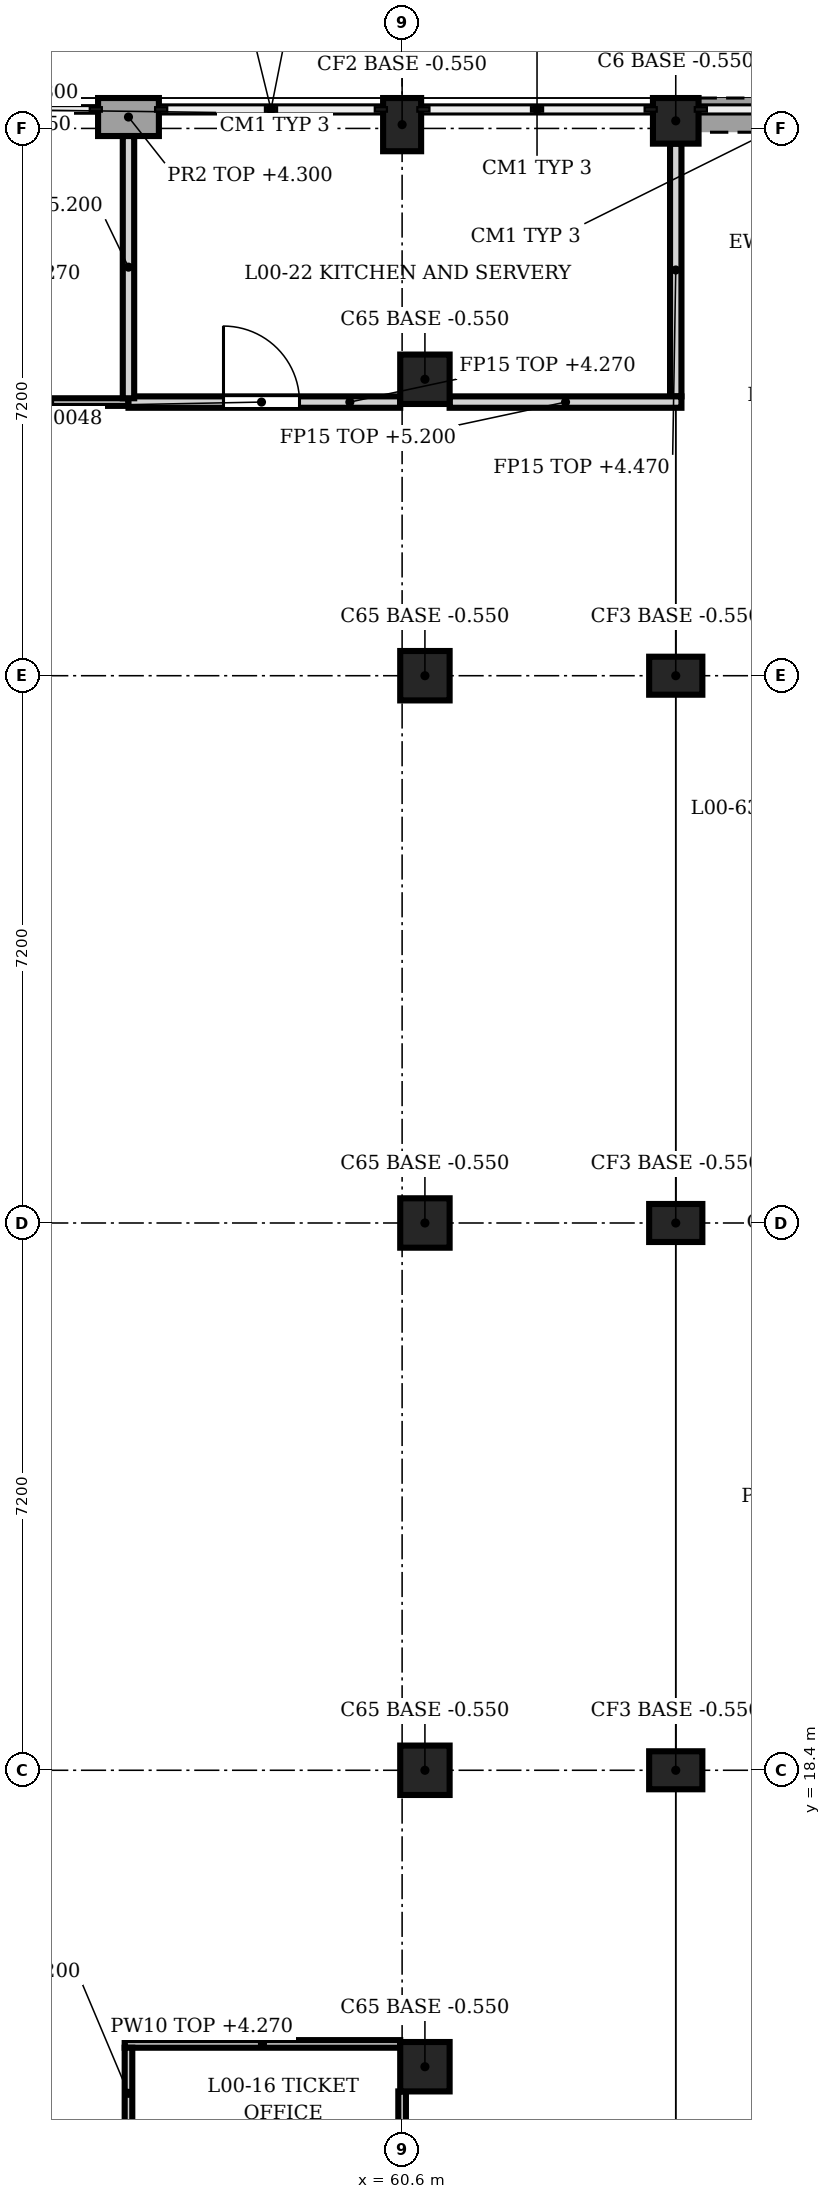
"""IFC4 building model, lengths in metres.
Left out: names, types, materials, properties, quantities, classifications, styles, units other than length and angle.
Written with IfcOpenShell. Run it as: python <this file> out.ifc"""

import sys

from ifc_helpers import new_model, si_unit, direction, frame, frame_2d, origin, origin_2d, place, context, subcontext, project, spatial, rectangle, extrude, element, fill, save


model = new_model("IFC4")
c1 = context("Model", 3, precision=1e-05, world=origin(), true_north=direction((0.0, 1.0)))
c2 = subcontext(c1, "Body", "Model", "MODEL_VIEW")
j1 = project(units=[si_unit("LENGTHUNIT", "METRE"), si_unit("PLANEANGLEUNIT", "RADIAN")], contexts=[c1])
p1 = place(None, origin())
s1 = spatial("IfcSite", under=j1, at=p1, CompositionType="ELEMENT")
p2 = place(p1, origin())
s2 = spatial("IfcBuilding", under=s1, at=p2, CompositionType="ELEMENT")
p3 = place(p2, origin())
s3 = spatial("IfcBuildingStorey", under=s2, at=p3, CompositionType="ELEMENT", Elevation=0.0)
p4 = place(p3, frame((60.6, 40.05, -0.55), z_axis=(0.0, 0.0, 1.0), x_axis=(1.0, 0.0, 0.0)))
e1 = element("IfcColumn", 1, at=p4, inside=s3, PredefinedType="COLUMN", context=c2, shape_type="SweptSolid", body=[
    extrude(rectangle(XDim=0.5, YDim=0.7, at=origin_2d()), origin(), (0.0, 0.0, 1.0), 5.95),
])
for number, where, z_axis, x_axis in (
    (2, (64.2, 18.4, -0.55), (0.0, 0.0, 1.0), (1.0, 0.0, 0.0)),
    (3, (64.2, 25.6, -0.55), (0.0, 0.0, 1.0), (1.0, 0.0, 0.0)),
    (4, (64.2, 32.8, -0.55), (0.0, 0.0, 1.0), (1.0, 0.0, 0.0)),
):
    element("IfcColumn", number, at=place(p3, frame(where, z_axis=z_axis, x_axis=x_axis)), inside=s3, PredefinedType="COLUMN", context=c2, shape_type="SweptSolid", body=[
        extrude(rectangle(XDim=0.7, YDim=0.5, at=origin_2d()), origin(), (0.0, 0.0, 1.0), 5.95),
    ])
p5 = place(p3, frame((64.2, 40.1, -0.55), z_axis=(0.0, 0.0, 1.0), x_axis=(1.0, 0.0, 0.0)))
e5 = element("IfcColumn", 5, at=p5, inside=s3, PredefinedType="COLUMN", context=c2, shape_type="SweptSolid", body=[
    extrude(rectangle(XDim=0.6, YDim=0.6, at=origin_2d()), origin(), (0.0, 0.0, 1.0), 5.95),
])
for number, where, z_axis, x_axis in (
    (6, (60.9, 14.5, -0.55), (0.0, 0.0, 1.0), (1.0, 0.0, 0.0)),
    (7, (60.9, 18.4, -0.55), (0.0, 0.0, 1.0), (1.0, 0.0, 0.0)),
    (8, (60.9, 25.6, -0.55), (0.0, 0.0, 1.0), (1.0, 0.0, 0.0)),
    (9, (60.9, 32.8, -0.55), (0.0, 0.0, 1.0), (1.0, 0.0, 0.0)),
    (10, (60.9, 36.7, -0.55), (0.0, 0.0, 1.0), (1.0, 0.0, 0.0)),
):
    element("IfcColumn", number, at=place(p3, frame(where, z_axis=z_axis, x_axis=x_axis)), inside=s3, PredefinedType="COLUMN", context=c2, shape_type="SweptSolid", body=[
        extrude(rectangle(XDim=0.65, YDim=0.65, at=origin_2d()), origin(), (0.0, 0.0, 1.0), 5.95),
    ])
p6 = place(p3, frame((56.6, 40.15, 0.0), z_axis=(0.0, 0.0, 1.0), x_axis=(1.0, 0.0, 0.0)))
e11 = element("IfcWall", 11, at=p6, inside=s3, PredefinedType="SOLIDWALL", context=c2, shape_type="SweptSolid", body=[
    extrude(rectangle(XDim=0.8, YDim=0.5, at=frame_2d((0.4, 0.0))), origin(), (0.0, 0.0, 1.0), 4.3),
])
p7 = place(p3, frame((64.5, 40.175, 0.0), z_axis=(0.0, 0.0, 1.0), x_axis=(1.0, 0.0, 0.0)))
e12 = element("IfcWall", 12, at=p7, inside=s3, PredefinedType="SOLIDWALL", context=c2, shape_type="SweptSolid", body=[
    extrude(rectangle(XDim=3.05, YDim=0.45, at=frame_2d((1.525, 0.0))), origin(), (0.0, 0.0, 1.0), 0.9),
])
p8 = place(p3, frame((56.95, 14.8, 0.0), z_axis=(0.0, 0.0, 1.0), x_axis=(1.0, 0.0, 0.0)))
e13 = element("IfcWall", 13, at=p8, inside=s3, PredefinedType="PARTITIONING", context=c2, shape_type="SweptSolid", body=[
    extrude(rectangle(XDim=3.625, YDim=0.1, at=frame_2d((1.812, 0.0))), origin(), (0.0, 0.0, 1.0), 4.27),
])
p9 = place(p3, frame((54.925, 36.4, 0.0), z_axis=(0.0, 0.0, 1.0), x_axis=(1.0, 0.0, 0.0)))
e14 = element("IfcWall", 14, at=p9, inside=s3, PredefinedType="PARTITIONING", context=c2, shape_type="SweptSolid", body=[
    extrude(rectangle(XDim=2.075, YDim=0.1, at=frame_2d((1.038, 0.0))), origin(), (0.0, 0.0, 1.0), 4.27),
])
p10 = place(p3, frame((57.0, 36.4, 0.0), z_axis=(0.0, 0.0, 1.0), x_axis=(1.0, 0.0, 0.0)))
e15 = element("IfcWall", 15, at=p10, inside=s3, PredefinedType="PARTITIONING", context=c2, shape_type="SweptSolid", body=[
    extrude(rectangle(XDim=3.575, YDim=0.15, at=frame_2d((1.788, 0.0))), origin(), (0.0, 0.0, 1.0), 4.27),
])
p11 = place(p10, frame((1.25, 0.0, 0.0)))
e16 = element("IfcOpeningElement", 16, at=p11, cuts=e15, PredefinedType="OPENING", context=c2, shape_type="SweptSolid", body=[
    extrude(rectangle(XDim=1.0, YDim=2.1, at=frame_2d((0.5, 1.05))), frame((0.0, 0.085, 0.0), z_axis=(0.0, -1.0, 0.0), x_axis=(1.0, 0.0, 0.0)), (0.0, 0.0, 1.0), 0.17),
])
p12 = place(p3, frame((61.225, 36.4, 0.0), z_axis=(0.0, 0.0, 1.0), x_axis=(1.0, 0.0, 0.0)))
e17 = element("IfcWall", 17, at=p12, inside=s3, PredefinedType="PARTITIONING", context=c2, shape_type="SweptSolid", body=[
    extrude(rectangle(XDim=3.05, YDim=0.15, at=frame_2d((1.525, 0.0))), origin(), (0.0, 0.0, 1.0), 5.2),
])
p13 = place(p3, frame((57.0, 14.75, 0.0), z_axis=(0.0, 0.0, 1.0), x_axis=(0.0, -1.0, 0.0)))
e18 = element("IfcWall", 18, at=p13, inside=s3, PredefinedType="PARTITIONING", context=c2, shape_type="SweptSolid", body=[
    extrude(rectangle(XDim=3.45, YDim=0.1, at=frame_2d((1.725, 0.0))), origin(), (0.0, 0.0, 1.0), 5.2),
])
p14 = place(p13, frame((1.2, 0.0, 0.0)))
e19 = element("IfcOpeningElement", 19, at=p14, cuts=e18, PredefinedType="OPENING", context=c2, shape_type="SweptSolid", body=[
    extrude(rectangle(XDim=1.1, YDim=2.2, at=frame_2d((0.55, 1.1))), frame((0.0, 0.06, 0.0), z_axis=(0.0, -1.0, 0.0), x_axis=(1.0, 0.0, 0.0)), (0.0, 0.0, 1.0), 0.12),
])
p15 = place(p3, frame((57.0, 36.45, 0.0), z_axis=(0.0, 0.0, 1.0), x_axis=(0.0, 1.0, 0.0)))
e20 = element("IfcWall", 20, at=p15, inside=s3, PredefinedType="PARTITIONING", context=c2, shape_type="SweptSolid", body=[
    extrude(rectangle(XDim=3.45, YDim=0.15, at=frame_2d((1.725, 0.0))), origin(), (0.0, 0.0, 1.0), 5.2),
])
p16 = place(p3, frame((60.6, 11.5, 0.0), z_axis=(0.0, 0.0, 1.0), x_axis=(0.0, 1.0, 0.0)))
e21 = element("IfcWall", 21, at=p16, inside=s3, PredefinedType="PARTITIONING", context=c2, shape_type="SweptSolid", body=[
    extrude(rectangle(XDim=2.675, YDim=0.1, at=frame_2d((1.337, 0.0))), origin(), (0.0, 0.0, 1.0), 5.2),
])
p17 = place(p3, frame((64.2, 36.475, 0.0), z_axis=(0.0, 0.0, 1.0), x_axis=(0.0, 1.0, 0.0)))
e22 = element("IfcWall", 22, at=p17, inside=s3, PredefinedType="PARTITIONING", context=c2, shape_type="SweptSolid", body=[
    extrude(rectangle(XDim=3.325, YDim=0.15, at=frame_2d((1.663, 0.0))), origin(), (0.0, 0.0, 1.0), 4.47),
])
p18 = place(p11, origin())
e23 = element("IfcDoor", 23, at=p18, inside=s3, OperationType="SINGLE_SWING_LEFT", PredefinedType="DOOR", context=c2, shape_type="SweptSolid", body=[
    extrude(rectangle(XDim=1.0, YDim=2.1, at=frame_2d((0.5, 1.05))), frame((0.0, 0.025, 0.0), z_axis=(0.0, -1.0, 0.0), x_axis=(1.0, 0.0, 0.0)), (0.0, 0.0, 1.0), 0.05),
])
fill(e16, e23)
save(model, sys.argv[1])
